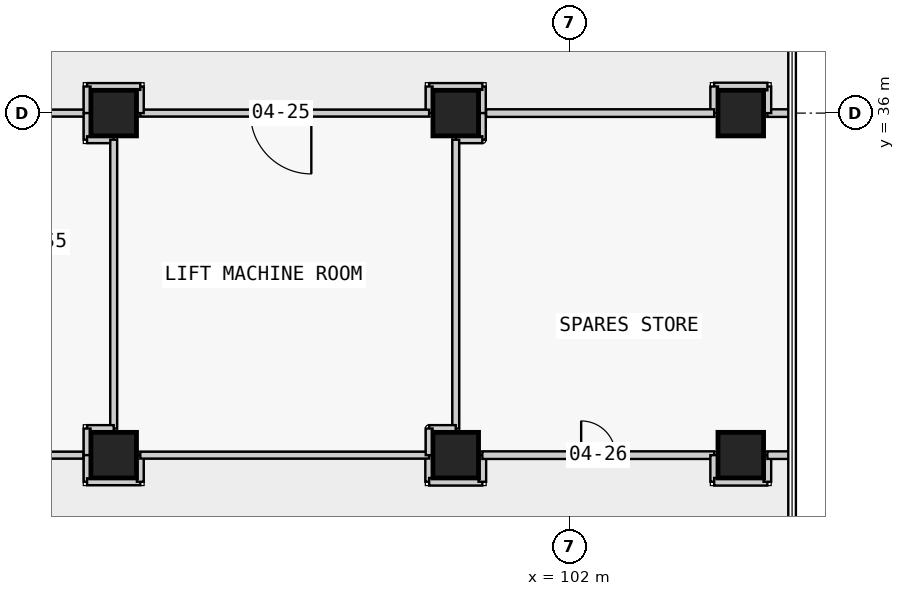
"""IFC4 building model, lengths in metres.
Left out: names, types, materials, properties, quantities, classifications, styles, units other than length and angle.
Written with IfcOpenShell. Run it as: python <this file> out.ifc"""

import sys

from ifc_helpers import new_model, si_unit, direction, frame, frame_2d, origin, origin_2d, place, context, subcontext, project, spatial, rectangle, extrude, element, fill, save


model = new_model("IFC4")
c1 = context("Model", 3, precision=1e-05, world=origin(), true_north=direction((0.0, 1.0)))
c2 = subcontext(c1, "Body", "Model", "MODEL_VIEW")
j1 = project(units=[si_unit("LENGTHUNIT", "METRE"), si_unit("PLANEANGLEUNIT", "RADIAN")], contexts=[c1])
p1 = place(None, origin())
s1 = spatial("IfcSite", under=j1, at=p1, CompositionType="ELEMENT")
p2 = place(p1, origin())
s2 = spatial("IfcBuilding", under=s1, at=p2, CompositionType="ELEMENT")
p3 = place(p2, frame((0.0, 0.0, 21.8)))
s3 = spatial("IfcBuildingStorey", under=s2, at=p3, CompositionType="ELEMENT", Elevation=21.8)
for number, where, z_axis, x_axis in (
    (1, (90.0, 27.0, 0.0), (0.0, 0.0, 1.0), (1.0, 0.0, 0.0)),
    (2, (90.0, 36.0, 0.0), (0.0, 0.0, 1.0), (1.0, 0.0, 0.0)),
    (3, (99.0, 27.0, 0.0), (0.0, 0.0, 1.0), (1.0, 0.0, 0.0)),
    (4, (99.0, 36.0, 0.0), (0.0, 0.0, 1.0), (1.0, 0.0, 0.0)),
    (5, (106.5, 27.0, 0.0), (0.0, 0.0, 1.0), (1.0, 0.0, 0.0)),
    (6, (106.5, 36.0, 0.0), (0.0, 0.0, 1.0), (1.0, 0.0, 0.0)),
):
    element("IfcColumn", number, at=place(p3, frame(where, z_axis=z_axis, x_axis=x_axis)), inside=s3, PredefinedType="COLUMN", context=c2, shape_type="SweptSolid", body=[
        extrude(rectangle(XDim=1.2, YDim=1.2, at=origin_2d()), origin(), (0.0, 0.0, 1.0), 5.0),
    ])
p4 = place(p3, frame((89.3, 36.0, 0.0), z_axis=(0.0, 0.0, 1.0), x_axis=(-1.0, 0.0, 0.0)))
e7 = element("IfcWall", 7, at=p4, inside=s3, PredefinedType="PARTITIONING", context=c2, shape_type="SweptSolid", body=[
    extrude(rectangle(XDim=7.6, YDim=0.18, at=frame_2d((3.8, 0.0))), origin(), (0.0, 0.0, 1.0), 4.5),
])
p5 = place(p4, frame((3.1, 0.0, 0.0)))
e8 = element("IfcOpeningElement", 8, at=p5, cuts=e7, PredefinedType="OPENING", context=c2, shape_type="SweptSolid", body=[
    extrude(rectangle(XDim=1.6, YDim=2.4, at=frame_2d((0.8, 1.2))), frame((0.0, 0.1, 0.0), z_axis=(0.0, -1.0, 0.0), x_axis=(1.0, 0.0, 0.0)), (0.0, 0.0, 1.0), 0.2),
])
p6 = place(p3, frame((99.7, 36.0, 0.0), z_axis=(0.0, 0.0, 1.0), x_axis=(0.0, 1.0, 0.0)))
e9 = element("IfcWall", 9, at=p6, inside=s3, PredefinedType="PARTITIONING", context=c2, shape_type="SweptSolid", body=[
    extrude(rectangle(XDim=0.7, YDim=0.18, at=frame_2d((0.35, 0.0))), origin(), (0.0, 0.0, 1.0), 4.5),
])
p7 = place(p3, frame((99.7, 36.7, 0.0), z_axis=(0.0, 0.0, 1.0), x_axis=(-1.0, 0.0, 0.0)))
e10 = element("IfcWall", 10, at=p7, inside=s3, PredefinedType="PARTITIONING", context=c2, shape_type="SweptSolid", body=[
    extrude(rectangle(XDim=1.4, YDim=0.18, at=frame_2d((0.7, 0.0))), origin(), (0.0, 0.0, 1.0), 4.5),
])
p8 = place(p3, frame((98.3, 36.7, 0.0), z_axis=(0.0, 0.0, 1.0), x_axis=(0.0, -1.0, 0.0)))
e11 = element("IfcWall", 11, at=p8, inside=s3, PredefinedType="PARTITIONING", context=c2, shape_type="SweptSolid", body=[
    extrude(rectangle(XDim=0.7, YDim=0.18, at=frame_2d((0.35, 0.0))), origin(), (0.0, 0.0, 1.0), 4.5),
])
p9 = place(p3, frame((98.3, 36.0, 0.0), z_axis=(0.0, 0.0, 1.0), x_axis=(-1.0, 0.0, 0.0)))
e12 = element("IfcWall", 12, at=p9, inside=s3, PredefinedType="PARTITIONING", context=c2, shape_type="SweptSolid", body=[
    extrude(rectangle(XDim=7.6, YDim=0.18, at=frame_2d((3.8, 0.0))), origin(), (0.0, 0.0, 1.0), 4.5),
])
p10 = place(p9, frame((3.1, 0.0, 0.0)))
e13 = element("IfcOpeningElement", 13, at=p10, cuts=e12, PredefinedType="OPENING", context=c2, shape_type="SweptSolid", body=[
    extrude(rectangle(XDim=1.6, YDim=2.4, at=frame_2d((0.8, 1.2))), frame((0.0, 0.1, 0.0), z_axis=(0.0, -1.0, 0.0), x_axis=(1.0, 0.0, 0.0)), (0.0, 0.0, 1.0), 0.2),
])
p11 = place(p3, frame((90.7, 36.0, 0.0), z_axis=(0.0, 0.0, 1.0), x_axis=(0.0, 1.0, 0.0)))
e14 = element("IfcWall", 14, at=p11, inside=s3, PredefinedType="PARTITIONING", context=c2, shape_type="SweptSolid", body=[
    extrude(rectangle(XDim=0.7, YDim=0.18, at=frame_2d((0.35, 0.0))), origin(), (0.0, 0.0, 1.0), 4.5),
])
p12 = place(p3, frame((90.7, 36.7, 0.0), z_axis=(0.0, 0.0, 1.0), x_axis=(-1.0, 0.0, 0.0)))
e15 = element("IfcWall", 15, at=p12, inside=s3, PredefinedType="PARTITIONING", context=c2, shape_type="SweptSolid", body=[
    extrude(rectangle(XDim=1.4, YDim=0.18, at=frame_2d((0.7, 0.0))), origin(), (0.0, 0.0, 1.0), 4.5),
])
p13 = place(p3, frame((89.3, 36.7, 0.0), z_axis=(0.0, 0.0, 1.0), x_axis=(0.0, -1.0, 0.0)))
e16 = element("IfcWall", 16, at=p13, inside=s3, PredefinedType="PARTITIONING", context=c2, shape_type="SweptSolid", body=[
    extrude(rectangle(XDim=0.7, YDim=0.18, at=frame_2d((0.35, 0.0))), origin(), (0.0, 0.0, 1.0), 4.5),
])
p14 = place(p3, frame((98.3, 27.0, 0.0), z_axis=(0.0, 0.0, 1.0), x_axis=(0.0, -1.0, 0.0)))
e17 = element("IfcWall", 17, at=p14, inside=s3, PredefinedType="PARTITIONING", context=c2, shape_type="SweptSolid", body=[
    extrude(rectangle(XDim=0.7, YDim=0.2, at=frame_2d((0.35, 0.0))), origin(), (0.0, 0.0, 1.0), 4.5),
])
p15 = place(p3, frame((98.3, 26.3, 0.0), z_axis=(0.0, 0.0, 1.0), x_axis=(1.0, 0.0, 0.0)))
e18 = element("IfcWall", 18, at=p15, inside=s3, PredefinedType="PARTITIONING", context=c2, shape_type="SweptSolid", body=[
    extrude(rectangle(XDim=1.4, YDim=0.2, at=frame_2d((0.7, 0.0))), origin(), (0.0, 0.0, 1.0), 4.5),
])
p16 = place(p3, frame((99.7, 26.3, 0.0), z_axis=(0.0, 0.0, 1.0), x_axis=(0.0, 1.0, 0.0)))
e19 = element("IfcWall", 19, at=p16, inside=s3, PredefinedType="PARTITIONING", context=c2, shape_type="SweptSolid", body=[
    extrude(rectangle(XDim=0.7, YDim=0.2, at=frame_2d((0.35, 0.0))), origin(), (0.0, 0.0, 1.0), 4.5),
])
p17 = place(p3, frame((99.7, 27.0, 0.0), z_axis=(0.0, 0.0, 1.0), x_axis=(1.0, 0.0, 0.0)))
e20 = element("IfcWall", 20, at=p17, inside=s3, PredefinedType="PARTITIONING", context=c2, shape_type="SweptSolid", body=[
    extrude(rectangle(XDim=6.1, YDim=0.2, at=frame_2d((3.05, 0.0))), origin(), (0.0, 0.0, 1.0), 4.5),
])
p18 = place(p17, frame((2.6, 0.0, 0.0)))
e21 = element("IfcOpeningElement", 21, at=p18, cuts=e20, PredefinedType="OPENING", context=c2, shape_type="SweptSolid", body=[
    extrude(rectangle(XDim=0.9, YDim=2.1, at=frame_2d((0.45, 1.05))), frame((0.0, 0.11, 0.0), z_axis=(0.0, -1.0, 0.0), x_axis=(1.0, 0.0, 0.0)), (0.0, 0.0, 1.0), 0.22),
])
p19 = place(p3, frame((105.8, 27.0, 0.0), z_axis=(0.0, 0.0, 1.0), x_axis=(0.0, -1.0, 0.0)))
e22 = element("IfcWall", 22, at=p19, inside=s3, PredefinedType="PARTITIONING", context=c2, shape_type="SweptSolid", body=[
    extrude(rectangle(XDim=0.7, YDim=0.2, at=frame_2d((0.35, 0.0))), origin(), (0.0, 0.0, 1.0), 4.5),
])
p20 = place(p3, frame((105.8, 26.3, 0.0), z_axis=(0.0, 0.0, 1.0), x_axis=(1.0, 0.0, 0.0)))
e23 = element("IfcWall", 23, at=p20, inside=s3, PredefinedType="PARTITIONING", context=c2, shape_type="SweptSolid", body=[
    extrude(rectangle(XDim=1.4, YDim=0.2, at=frame_2d((0.7, 0.0))), origin(), (0.0, 0.0, 1.0), 4.5),
])
p21 = place(p3, frame((107.2, 26.3, 0.0), z_axis=(0.0, 0.0, 1.0), x_axis=(0.0, 1.0, 0.0)))
e24 = element("IfcWall", 24, at=p21, inside=s3, PredefinedType="PARTITIONING", context=c2, shape_type="SweptSolid", body=[
    extrude(rectangle(XDim=0.7, YDim=0.2, at=frame_2d((0.35, 0.0))), origin(), (0.0, 0.0, 1.0), 4.5),
])
p22 = place(p3, frame((107.2, 27.0, 0.0), z_axis=(0.0, 0.0, 1.0), x_axis=(1.0, 0.0, 0.0)))
e25 = element("IfcWall", 25, at=p22, inside=s3, PredefinedType="PARTITIONING", context=c2, shape_type="SweptSolid", body=[
    extrude(rectangle(XDim=0.65, YDim=0.2, at=frame_2d((0.325, 0.0))), origin(), (0.0, 0.0, 1.0), 4.5),
])
for number, where, z_axis, x_axis in (
    (26, (89.3, 36.0, 0.0), (0.0, 0.0, 1.0), (0.0, -1.0, 0.0)),
    (27, (89.3, 35.3, 0.0), (0.0, 0.0, 1.0), (1.0, 0.0, 0.0)),
):
    element("IfcWall", number, at=place(p3, frame(where, z_axis=z_axis, x_axis=x_axis)), inside=s3, PredefinedType="PARTITIONING", context=c2, shape_type="SweptSolid", body=[
        extrude(rectangle(XDim=0.7, YDim=0.18, at=frame_2d((0.35, 0.0))), origin(), (0.0, 0.0, 1.0), 4.5),
    ])
p23 = place(p3, frame((90.0, 35.3, 0.0), z_axis=(0.0, 0.0, 1.0), x_axis=(0.0, -1.0, 0.0)))
e28 = element("IfcWall", 28, at=p23, inside=s3, PredefinedType="PARTITIONING", context=c2, shape_type="SweptSolid", body=[
    extrude(rectangle(XDim=7.6, YDim=0.18, at=frame_2d((3.8, 0.0))), origin(), (0.0, 0.0, 1.0), 4.5),
])
for number, where, z_axis, x_axis in (
    (29, (90.0, 27.7, 0.0), (0.0, 0.0, 1.0), (-1.0, 0.0, 0.0)),
    (30, (89.3, 27.7, 0.0), (0.0, 0.0, 1.0), (0.0, -1.0, 0.0)),
    (31, (89.3, 27.0, 0.0), (0.0, 0.0, 1.0), (0.0, -1.0, 0.0)),
):
    element("IfcWall", number, at=place(p3, frame(where, z_axis=z_axis, x_axis=x_axis)), inside=s3, PredefinedType="PARTITIONING", context=c2, shape_type="SweptSolid", body=[
        extrude(rectangle(XDim=0.7, YDim=0.18, at=frame_2d((0.35, 0.0))), origin(), (0.0, 0.0, 1.0), 4.5),
    ])
p24 = place(p3, frame((89.3, 26.3, 0.0), z_axis=(0.0, 0.0, 1.0), x_axis=(1.0, 0.0, 0.0)))
e32 = element("IfcWall", 32, at=p24, inside=s3, PredefinedType="PARTITIONING", context=c2, shape_type="SweptSolid", body=[
    extrude(rectangle(XDim=1.4, YDim=0.18, at=frame_2d((0.7, 0.0))), origin(), (0.0, 0.0, 1.0), 4.5),
])
p25 = place(p3, frame((90.7, 26.3, 0.0), z_axis=(0.0, 0.0, 1.0), x_axis=(0.0, 1.0, 0.0)))
e33 = element("IfcWall", 33, at=p25, inside=s3, PredefinedType="PARTITIONING", context=c2, shape_type="SweptSolid", body=[
    extrude(rectangle(XDim=0.7, YDim=0.18, at=frame_2d((0.35, 0.0))), origin(), (0.0, 0.0, 1.0), 4.5),
])
p26 = place(p3, frame((90.7, 27.0, 0.0), z_axis=(0.0, 0.0, 1.0), x_axis=(1.0, 0.0, 0.0)))
e34 = element("IfcWall", 34, at=p26, inside=s3, PredefinedType="PARTITIONING", context=c2, shape_type="SweptSolid", body=[
    extrude(rectangle(XDim=7.6, YDim=0.18, at=frame_2d((3.8, 0.0))), origin(), (0.0, 0.0, 1.0), 4.5),
])
for number, where, z_axis, x_axis in (
    (35, (99.7, 36.0, 0.0), (0.0, 0.0, 1.0), (0.0, -1.0, 0.0)),
    (36, (99.7, 35.3, 0.0), (0.0, 0.0, 1.0), (-1.0, 0.0, 0.0)),
):
    element("IfcWall", number, at=place(p3, frame(where, z_axis=z_axis, x_axis=x_axis)), inside=s3, PredefinedType="PARTITIONING", context=c2, shape_type="SweptSolid", body=[
        extrude(rectangle(XDim=0.7, YDim=0.18, at=frame_2d((0.35, 0.0))), origin(), (0.0, 0.0, 1.0), 4.5),
    ])
p27 = place(p3, frame((99.0, 35.3, 0.0), z_axis=(0.0, 0.0, 1.0), x_axis=(0.0, -1.0, 0.0)))
e37 = element("IfcWall", 37, at=p27, inside=s3, PredefinedType="PARTITIONING", context=c2, shape_type="SweptSolid", body=[
    extrude(rectangle(XDim=7.6, YDim=0.18, at=frame_2d((3.8, 0.0))), origin(), (0.0, 0.0, 1.0), 4.5),
])
for number, where, z_axis, x_axis in (
    (38, (99.0, 27.7, 0.0), (0.0, 0.0, 1.0), (-1.0, 0.0, 0.0)),
    (39, (98.3, 27.7, 0.0), (0.0, 0.0, 1.0), (0.0, -1.0, 0.0)),
):
    element("IfcWall", number, at=place(p3, frame(where, z_axis=z_axis, x_axis=x_axis)), inside=s3, PredefinedType="PARTITIONING", context=c2, shape_type="SweptSolid", body=[
        extrude(rectangle(XDim=0.7, YDim=0.18, at=frame_2d((0.35, 0.0))), origin(), (0.0, 0.0, 1.0), 4.5),
    ])
p28 = place(p3, frame((107.85, 36.0, 0.0), z_axis=(0.0, 0.0, 1.0), x_axis=(-1.0, 0.0, 0.0)))
e40 = element("IfcWall", 40, at=p28, inside=s3, PredefinedType="PARTITIONING", context=c2, shape_type="SweptSolid", body=[
    extrude(rectangle(XDim=0.65, YDim=0.2, at=frame_2d((0.325, 0.0))), origin(), (0.0, 0.0, 1.0), 4.5),
])
p29 = place(p3, frame((107.2, 36.0, 0.0), z_axis=(0.0, 0.0, 1.0), x_axis=(0.0, 1.0, 0.0)))
e41 = element("IfcWall", 41, at=p29, inside=s3, PredefinedType="PARTITIONING", context=c2, shape_type="SweptSolid", body=[
    extrude(rectangle(XDim=0.7, YDim=0.2, at=frame_2d((0.35, 0.0))), origin(), (0.0, 0.0, 1.0), 4.5),
])
p30 = place(p3, frame((107.2, 36.7, 0.0), z_axis=(0.0, 0.0, 1.0), x_axis=(-1.0, 0.0, 0.0)))
e42 = element("IfcWall", 42, at=p30, inside=s3, PredefinedType="PARTITIONING", context=c2, shape_type="SweptSolid", body=[
    extrude(rectangle(XDim=1.4, YDim=0.2, at=frame_2d((0.7, 0.0))), origin(), (0.0, 0.0, 1.0), 4.5),
])
p31 = place(p3, frame((105.8, 36.7, 0.0), z_axis=(0.0, 0.0, 1.0), x_axis=(0.0, -1.0, 0.0)))
e43 = element("IfcWall", 43, at=p31, inside=s3, PredefinedType="PARTITIONING", context=c2, shape_type="SweptSolid", body=[
    extrude(rectangle(XDim=0.7, YDim=0.2, at=frame_2d((0.35, 0.0))), origin(), (0.0, 0.0, 1.0), 4.5),
])
p32 = place(p3, frame((105.8, 36.0, 0.0), z_axis=(0.0, 0.0, 1.0), x_axis=(-1.0, 0.0, 0.0)))
e44 = element("IfcWall", 44, at=p32, inside=s3, PredefinedType="PARTITIONING", context=c2, shape_type="SweptSolid", body=[
    extrude(rectangle(XDim=6.0, YDim=0.2, at=frame_2d((3.0, 0.0))), origin(), (0.0, 0.0, 1.0), 4.5),
])
p33 = place(p3, frame((86.75, 27.0, 0.0), z_axis=(0.0, 0.0, 1.0), x_axis=(1.0, 0.0, 0.0)))
e45 = element("IfcWall", 45, at=p33, inside=s3, PredefinedType="PARTITIONING", context=c2, shape_type="SweptSolid", body=[
    extrude(rectangle(XDim=2.45, YDim=0.18, at=frame_2d((1.225, 0.0))), origin(), (0.0, 0.0, 1.0), 4.5),
])
p34 = place(p10, origin())
e46 = element("IfcDoor", 46, at=p34, inside=s3, OperationType="SINGLE_SWING_LEFT", PredefinedType="DOOR", context=c2, shape_type="SweptSolid", body=[
    extrude(rectangle(XDim=1.6, YDim=2.4, at=frame_2d((0.8, 1.2))), frame((0.0, 0.025, 0.0), z_axis=(0.0, -1.0, 0.0), x_axis=(1.0, 0.0, 0.0)), (0.0, 0.0, 1.0), 0.05),
])
fill(e13, e46)
p35 = place(p18, origin())
e47 = element("IfcDoor", 47, at=p35, inside=s3, OperationType="SINGLE_SWING_LEFT", PredefinedType="DOOR", context=c2, shape_type="SweptSolid", body=[
    extrude(rectangle(XDim=0.9, YDim=2.1, at=frame_2d((0.45, 1.05))), frame((0.0, 0.025, 0.0), z_axis=(0.0, -1.0, 0.0), x_axis=(1.0, 0.0, 0.0)), (0.0, 0.0, 1.0), 0.05),
])
fill(e21, e47)
save(model, sys.argv[1])
